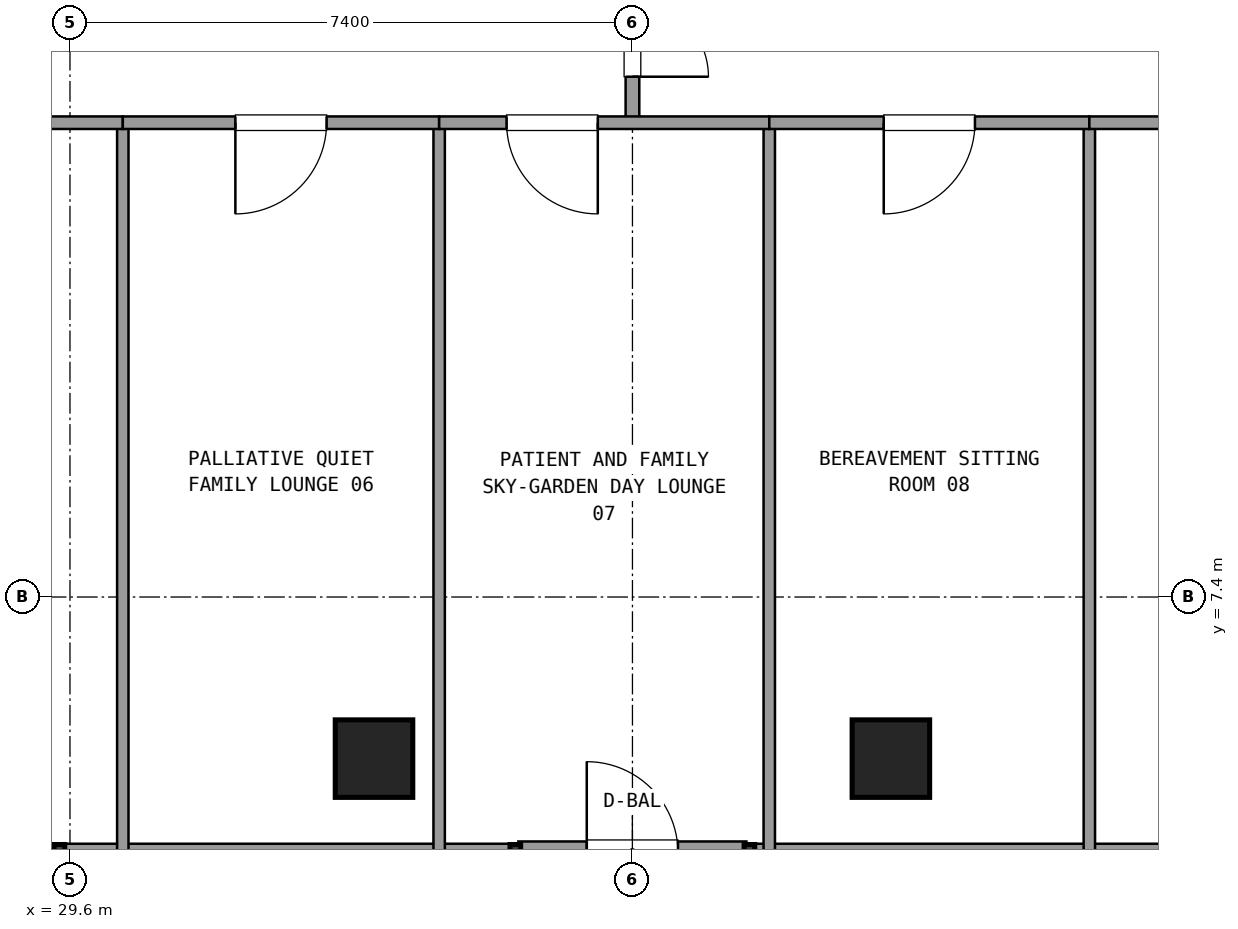
"""IFC4 building model, lengths in metres.
Left out: names, types, materials, properties, quantities, classifications, styles, units other than length and angle.
Written with IfcOpenShell. Run it as: python <this file> out.ifc"""

import sys

from ifc_helpers import new_model, si_unit, direction, frame, frame_2d, origin, origin_2d, place, context, subcontext, project, spatial, rectangle, extrude, element, fill, save


model = new_model("IFC4")
c1 = context("Model", 3, precision=1e-05, world=origin(), true_north=direction((0.0, 1.0)))
c2 = subcontext(c1, "Body", "Model", "MODEL_VIEW")
j1 = project(units=[si_unit("LENGTHUNIT", "METRE"), si_unit("PLANEANGLEUNIT", "RADIAN")], contexts=[c1])
p1 = place(None, origin())
s1 = spatial("IfcSite", under=j1, at=p1, CompositionType="ELEMENT")
p2 = place(p1, origin())
s2 = spatial("IfcBuilding", under=s1, at=p2, CompositionType="ELEMENT")
p3 = place(p2, frame((0.0, 0.0, 102.78)))
s3 = spatial("IfcBuildingStorey", under=s2, at=p3, CompositionType="ELEMENT", Elevation=102.78)
for number, where, z_axis, x_axis in (
    (1, (33.6, 5.274, 0.021), (0.0, 0.025, 1.0), (-1.0, 0.0, 0.0)),
    (2, (40.4, 5.274, 0.021), (0.0, 0.025, 1.0), (-1.0, 0.0, 0.0)),
):
    element("IfcColumn", number, at=place(p3, frame(where, z_axis=z_axis, x_axis=x_axis)), inside=s3, PredefinedType="COLUMN", context=c2, shape_type="SweptSolid", body=[
        extrude(rectangle(XDim=1.02, YDim=1.02, at=origin_2d()), origin(), (0.0, 0.0, 1.0), 3.559),
    ])
p4 = place(p3, frame((35.499, 4.034, 0.0), z_axis=(0.0, 0.0, 1.0), x_axis=(1.0, 0.0, 0.0)))
e3 = element("IfcWall", 3, at=p4, inside=s3, PredefinedType="SOLIDWALL", context=c2, shape_type="SweptSolid", body=[
    extrude(rectangle(XDim=3.0, YDim=0.3, at=frame_2d((1.5, 0.0))), origin(), (0.0, 0.0, 1.0), 2.67),
])
p5 = place(p4, frame((0.9, 0.0, 0.0)))
e4 = element("IfcOpeningElement", 4, at=p5, cuts=e3, PredefinedType="OPENING", context=c2, shape_type="SweptSolid", body=[
    extrude(rectangle(XDim=1.2, YDim=2.2, at=frame_2d((0.6, 1.1))), frame((0.0, 0.16, 0.0), z_axis=(0.0, -1.0, 0.0), x_axis=(1.0, 0.0, 0.0)), (0.0, 0.0, 1.0), 0.32),
])
p6 = place(p3, frame((17.464, 4.034, 0.0), z_axis=(0.0, 0.0, 1.0), x_axis=(1.0, 0.0, 0.0)))
e5 = element("IfcWall", 5, at=p6, inside=s3, PredefinedType="SOLIDWALL", context=c2, shape_type="SweptSolid", body=[
    extrude(rectangle(XDim=17.995, YDim=0.24, at=frame_2d((8.998, 0.0))), origin(), (0.0, 0.0, 1.0), 0.85),
])
p7 = place(p3, frame((38.539, 4.034, 0.0), z_axis=(0.0, 0.0, 1.0), x_axis=(1.0, 0.0, 0.0)))
e6 = element("IfcWall", 6, at=p7, inside=s3, PredefinedType="SOLIDWALL", context=c2, shape_type="SweptSolid", body=[
    extrude(rectangle(XDim=17.997, YDim=0.24, at=frame_2d((8.999, 0.0))), origin(), (0.0, 0.0, 1.0), 0.85),
])
p8 = place(p3, frame((37.0, 13.64, 0.0), z_axis=(0.0, 0.0, 1.0), x_axis=(0.0, 1.0, 0.0)))
e7 = element("IfcWall", 7, at=p8, inside=s3, PredefinedType="PARTITIONING", context=c2, shape_type="SweptSolid", body=[
    extrude(rectangle(XDim=3.21, YDim=0.18, at=frame_2d((1.605, 0.0))), origin(), (0.0, 0.0, 1.0), 2.61),
])
p9 = place(p8, frame((0.605, 0.0, 0.0)))
e8 = element("IfcOpeningElement", 8, at=p9, cuts=e7, PredefinedType="OPENING", context=c2, shape_type="SweptSolid", body=[
    extrude(rectangle(XDim=2.0, YDim=2.2, at=frame_2d((1.0, 1.1))), frame((0.0, 0.1, 0.0), z_axis=(0.0, -1.0, 0.0), x_axis=(1.0, 0.0, 0.0)), (0.0, 0.0, 1.0), 0.2),
])
p10 = place(p3, frame((30.295, 13.64, 0.0), z_axis=(0.0, 0.0, 1.0), x_axis=(0.0, -1.0, 0.0)))
e9 = element("IfcWall", 9, at=p10, inside=s3, PredefinedType="PARTITIONING", context=c2, shape_type="SweptSolid", body=[
    extrude(rectangle(XDim=9.586, YDim=0.15, at=frame_2d((4.793, 0.0))), origin(), (0.0, 0.0, 1.0), 2.61),
])
p11 = place(p3, frame((25.43, 13.64, 0.0), z_axis=(0.0, 0.0, 1.0), x_axis=(1.0, 0.0, 0.0)))
e10 = element("IfcWall", 10, at=p11, inside=s3, PredefinedType="PARTITIONING", context=c2, shape_type="SweptSolid", body=[
    extrude(rectangle(XDim=4.865, YDim=0.165, at=frame_2d((2.433, 0.0))), origin(), (0.0, 0.0, 1.0), 2.61),
])
p12 = place(p11, frame((1.833, 0.0, 0.0)))
e11 = element("IfcOpeningElement", 11, at=p12, cuts=e10, PredefinedType="OPENING", context=c2, shape_type="SweptSolid", body=[
    extrude(rectangle(XDim=1.2, YDim=2.15, at=frame_2d((0.6, 1.075))), frame((0.0, 0.093, 0.0), z_axis=(0.0, -1.0, 0.0), x_axis=(1.0, 0.0, 0.0)), (0.0, 0.0, 1.0), 0.185),
])
p13 = place(p3, frame((34.457, 13.64, 0.0), z_axis=(0.0, 0.0, 1.0), x_axis=(0.0, -1.0, 0.0)))
e12 = element("IfcWall", 12, at=p13, inside=s3, PredefinedType="PARTITIONING", context=c2, shape_type="SweptSolid", body=[
    extrude(rectangle(XDim=9.586, YDim=0.15, at=frame_2d((4.793, 0.0))), origin(), (0.0, 0.0, 1.0), 2.61),
])
p14 = place(p3, frame((30.295, 13.64, 0.0), z_axis=(0.0, 0.0, 1.0), x_axis=(1.0, 0.0, 0.0)))
e13 = element("IfcWall", 13, at=p14, inside=s3, PredefinedType="PARTITIONING", context=c2, shape_type="SweptSolid", body=[
    extrude(rectangle(XDim=4.162, YDim=0.165, at=frame_2d((2.081, 0.0))), origin(), (0.0, 0.0, 1.0), 2.61),
])
p15 = place(p14, frame((1.481, 0.0, 0.0)))
e14 = element("IfcOpeningElement", 14, at=p15, cuts=e13, PredefinedType="OPENING", context=c2, shape_type="SweptSolid", body=[
    extrude(rectangle(XDim=1.2, YDim=2.15, at=frame_2d((0.6, 1.075))), frame((0.0, 0.093, 0.0), z_axis=(0.0, -1.0, 0.0), x_axis=(1.0, 0.0, 0.0)), (0.0, 0.0, 1.0), 0.185),
])
p16 = place(p3, frame((38.8, 13.64, 0.0), z_axis=(0.0, 0.0, 1.0), x_axis=(0.0, -1.0, 0.0)))
e15 = element("IfcWall", 15, at=p16, inside=s3, PredefinedType="PARTITIONING", context=c2, shape_type="SweptSolid", body=[
    extrude(rectangle(XDim=9.586, YDim=0.15, at=frame_2d((4.793, 0.0))), origin(), (0.0, 0.0, 1.0), 2.61),
])
p17 = place(p3, frame((34.457, 13.64, 0.0), z_axis=(0.0, 0.0, 1.0), x_axis=(1.0, 0.0, 0.0)))
e16 = element("IfcWall", 16, at=p17, inside=s3, PredefinedType="PARTITIONING", context=c2, shape_type="SweptSolid", body=[
    extrude(rectangle(XDim=4.343, YDim=0.165, at=frame_2d((2.171, 0.0))), origin(), (0.0, 0.0, 1.0), 2.61),
])
p18 = place(p17, frame((0.887, 0.0, 0.0)))
e17 = element("IfcOpeningElement", 17, at=p18, cuts=e16, PredefinedType="OPENING", context=c2, shape_type="SweptSolid", body=[
    extrude(rectangle(XDim=1.2, YDim=2.15, at=frame_2d((0.6, 1.075))), frame((0.0, 0.093, 0.0), z_axis=(0.0, -1.0, 0.0), x_axis=(1.0, 0.0, 0.0)), (0.0, 0.0, 1.0), 0.185),
])
p19 = place(p3, frame((43.011, 13.64, 0.0), z_axis=(0.0, 0.0, 1.0), x_axis=(0.0, -1.0, 0.0)))
e18 = element("IfcWall", 18, at=p19, inside=s3, PredefinedType="PARTITIONING", context=c2, shape_type="SweptSolid", body=[
    extrude(rectangle(XDim=9.586, YDim=0.15, at=frame_2d((4.793, 0.0))), origin(), (0.0, 0.0, 1.0), 2.61),
])
p20 = place(p3, frame((38.8, 13.64, 0.0), z_axis=(0.0, 0.0, 1.0), x_axis=(1.0, 0.0, 0.0)))
e19 = element("IfcWall", 19, at=p20, inside=s3, PredefinedType="PARTITIONING", context=c2, shape_type="SweptSolid", body=[
    extrude(rectangle(XDim=4.211, YDim=0.165, at=frame_2d((2.105, 0.0))), origin(), (0.0, 0.0, 1.0), 2.61),
])
p21 = place(p20, frame((1.506, 0.0, 0.0)))
e20 = element("IfcOpeningElement", 20, at=p21, cuts=e19, PredefinedType="OPENING", context=c2, shape_type="SweptSolid", body=[
    extrude(rectangle(XDim=1.2, YDim=2.15, at=frame_2d((0.6, 1.075))), frame((0.0, 0.093, 0.0), z_axis=(0.0, -1.0, 0.0), x_axis=(1.0, 0.0, 0.0)), (0.0, 0.0, 1.0), 0.185),
])
p22 = place(p3, frame((43.011, 13.64, 0.0), z_axis=(0.0, 0.0, 1.0), x_axis=(1.0, 0.0, 0.0)))
e21 = element("IfcWall", 21, at=p22, inside=s3, PredefinedType="PARTITIONING", context=c2, shape_type="SweptSolid", body=[
    extrude(rectangle(XDim=5.559, YDim=0.165, at=frame_2d((2.78, 0.0))), origin(), (0.0, 0.0, 1.0), 2.61),
])
p23 = place(p22, frame((2.179, 0.0, 0.0)))
e22 = element("IfcOpeningElement", 22, at=p23, cuts=e21, PredefinedType="OPENING", context=c2, shape_type="SweptSolid", body=[
    extrude(rectangle(XDim=1.2, YDim=2.15, at=frame_2d((0.6, 1.075))), frame((0.0, 0.093, 0.0), z_axis=(0.0, -1.0, 0.0), x_axis=(1.0, 0.0, 0.0)), (0.0, 0.0, 1.0), 0.185),
])
p24 = place(p9, frame((2.0, 0.0, 0.0), z_axis=(0.0, 0.0, 1.0), x_axis=(-1.0, 0.0, 0.0)))
e23 = element("IfcDoor", 23, at=p24, inside=s3, OperationType="DOUBLE_DOOR_SINGLE_SWING", PredefinedType="DOOR", context=c2, shape_type="SweptSolid", body=[
    extrude(rectangle(XDim=2.0, YDim=2.2, at=frame_2d((1.0, 1.1))), frame((0.0, 0.025, 0.0), z_axis=(0.0, -1.0, 0.0), x_axis=(1.0, 0.0, 0.0)), (0.0, 0.0, 1.0), 0.05),
])
fill(e8, e23)
p25 = place(p15, frame((1.2, 0.0, 0.0), z_axis=(0.0, 0.0, 1.0), x_axis=(-1.0, 0.0, 0.0)))
e24 = element("IfcDoor", 24, at=p25, inside=s3, OperationType="SINGLE_SWING_LEFT", PredefinedType="DOOR", context=c2, shape_type="SweptSolid", body=[
    extrude(rectangle(XDim=1.2, YDim=2.15, at=frame_2d((0.6, 1.075))), frame((0.0, 0.025, 0.0), z_axis=(0.0, -1.0, 0.0), x_axis=(1.0, 0.0, 0.0)), (0.0, 0.0, 1.0), 0.05),
])
fill(e14, e24)
p26 = place(p18, frame((1.2, 0.0, 0.0), z_axis=(0.0, 0.0, 1.0), x_axis=(-1.0, 0.0, 0.0)))
e25 = element("IfcDoor", 25, at=p26, inside=s3, OperationType="SINGLE_SWING_RIGHT", PredefinedType="DOOR", context=c2, shape_type="SweptSolid", body=[
    extrude(rectangle(XDim=1.2, YDim=2.15, at=frame_2d((0.6, 1.075))), frame((0.0, 0.025, 0.0), z_axis=(0.0, -1.0, 0.0), x_axis=(1.0, 0.0, 0.0)), (0.0, 0.0, 1.0), 0.05),
])
fill(e17, e25)
p27 = place(p21, frame((1.2, 0.0, 0.0), z_axis=(0.0, 0.0, 1.0), x_axis=(-1.0, 0.0, 0.0)))
e26 = element("IfcDoor", 26, at=p27, inside=s3, OperationType="SINGLE_SWING_LEFT", PredefinedType="DOOR", context=c2, shape_type="SweptSolid", body=[
    extrude(rectangle(XDim=1.2, YDim=2.15, at=frame_2d((0.6, 1.075))), frame((0.0, 0.025, 0.0), z_axis=(0.0, -1.0, 0.0), x_axis=(1.0, 0.0, 0.0)), (0.0, 0.0, 1.0), 0.05),
])
fill(e20, e26)
save(model, sys.argv[1])
